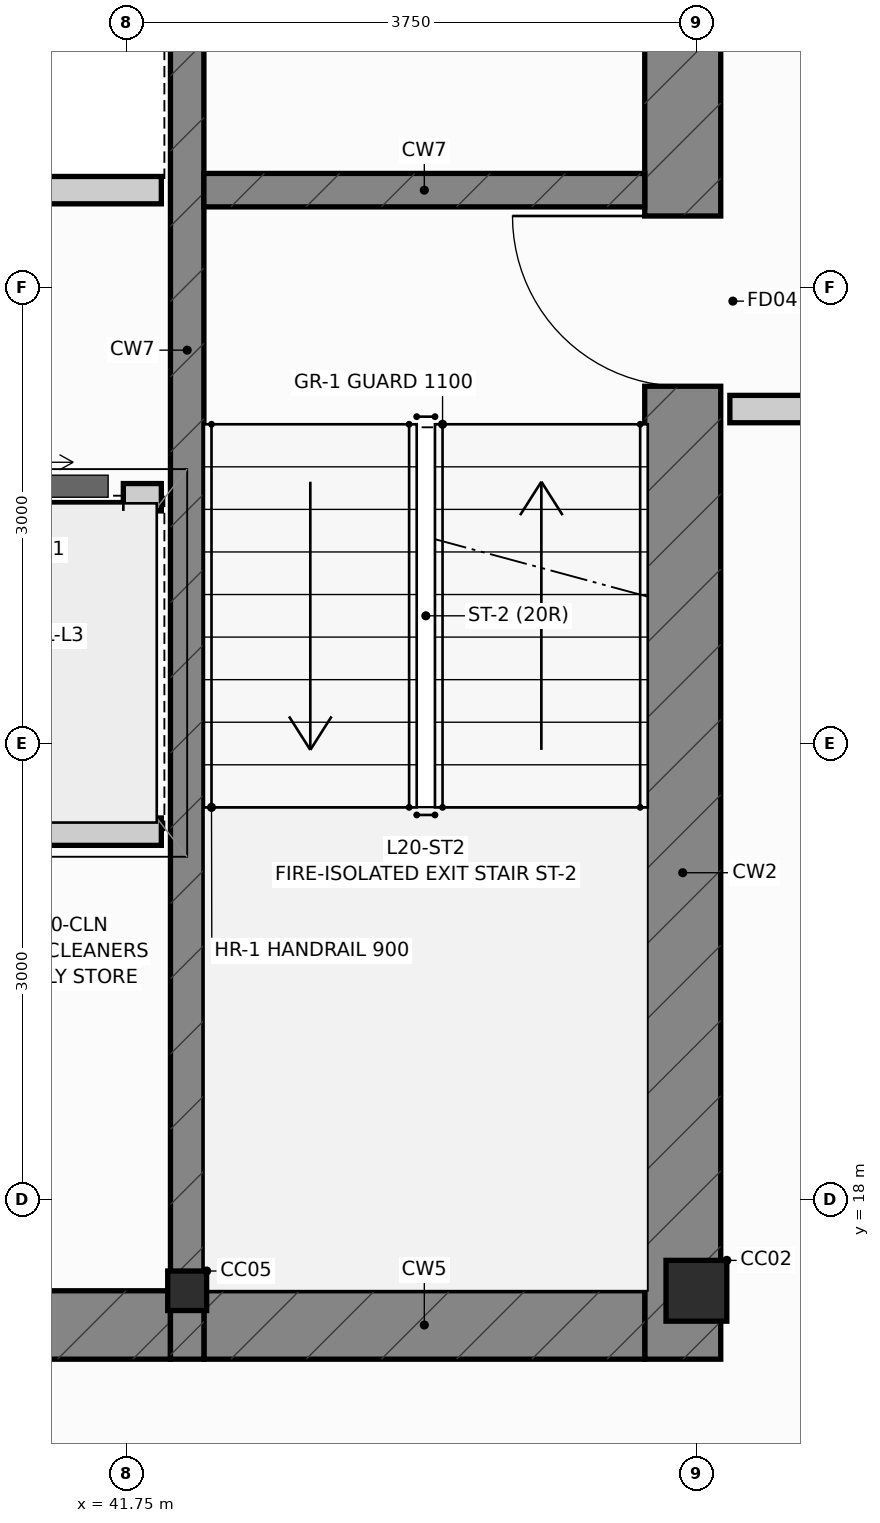
"""IFC4 building model, lengths in metres.
Left out: names, types, materials, properties, quantities, classifications, styles, units other than length and angle.
Written with IfcOpenShell. Run it as: python <this file> out.ifc"""

import sys

from ifc_helpers import new_model, si_unit, direction, frame, frame_2d, origin, origin_2d, place, context, subcontext, project, spatial, rectangle, i_section, extrude, source, transform, mapped, element, fill, save


model = new_model("IFC4")
c1 = context("Model", 3, precision=1e-05, world=origin(), true_north=direction((0.0, 1.0)))
c2 = subcontext(c1, "Body", "Model", "MODEL_VIEW")
j1 = project(units=[si_unit("LENGTHUNIT", "METRE"), si_unit("PLANEANGLEUNIT", "RADIAN")], contexts=[c1])
p1 = place(None, origin())
s1 = spatial("IfcSite", under=j1, at=p1, CompositionType="ELEMENT")
p2 = place(p1, origin())
s2 = spatial("IfcBuilding", under=s1, at=p2, CompositionType="ELEMENT")
p3 = place(p2, frame((0.0, 0.0, 105.4)))
s3 = spatial("IfcBuildingStorey", under=s2, at=p3, CompositionType="ELEMENT", Elevation=105.4)
m1 = source(origin(), c2, "Body", "SweptSolid", [
    extrude(i_section(OverallWidth=0.4, OverallDepth=0.4, WebThickness=0.02, FlangeThickness=0.032, at=origin_2d()), origin(), (0.0, 0.0, 1.0), 3.65),
])
p4 = place(p3, frame((45.5, 17.4, 0.0), z_axis=(0.0, 0.0, 1.0), x_axis=(1.0, 0.0, 0.0)))
e1 = element("IfcColumn", 1, at=p4, inside=s3, PredefinedType="COLUMN", context=c2, shape_type="MappedRepresentation", body=[
    mapped(m1, transform((0.0, 0.0, 0.0), scale=1.0)),
])
m2 = source(origin(), c2, "Body", "SweptSolid", [
    extrude(i_section(OverallWidth=0.256, OverallDepth=0.26, WebThickness=0.01, FlangeThickness=0.017, at=origin_2d()), origin(), (0.0, 0.0, 1.0), 3.65),
])
p5 = place(p3, frame((42.15, 17.4, 0.0), z_axis=(0.0, 0.0, 1.0), x_axis=(1.0, 0.0, 0.0)))
e2 = element("IfcColumn", 2, at=p5, inside=s3, PredefinedType="COLUMN", context=c2, shape_type="MappedRepresentation", body=[
    mapped(m2, transform((0.0, 0.0, 0.0), scale=1.0)),
])
p6 = place(p3, frame((45.41, 16.95, 0.0), z_axis=(0.0, 0.0, 1.0), x_axis=(0.0, 1.0, 0.0)))
e3 = element("IfcWall", 3, at=p6, inside=s3, PredefinedType="SHEAR", context=c2, shape_type="SweptSolid", body=[
    extrude(rectangle(XDim=13.275, YDim=0.5, at=frame_2d((6.638, 0.0))), origin(), (0.0, 0.0, 1.0), 3.65),
])
p7 = place(p6, frame((6.4, 0.0, 0.0)))
e4 = element("IfcOpeningElement", 4, at=p7, cuts=e3, PredefinedType="OPENING", context=c2, shape_type="SweptSolid", body=[
    extrude(rectangle(XDim=1.12, YDim=2.15, at=frame_2d((0.56, 1.075))), frame((0.0, 0.262, 0.0), z_axis=(0.0, -1.0, 0.0), x_axis=(1.0, 0.0, 0.0)), (0.0, 0.0, 1.0), 0.524),
])
p8 = place(p6, frame((10.85, 0.0, 0.0)))
e5 = element("IfcOpeningElement", 5, at=p8, cuts=e3, PredefinedType="OPENING", context=c2, shape_type="SweptSolid", body=[
    extrude(rectangle(XDim=1.2, YDim=2.2, at=frame_2d((0.6, 1.1))), frame((0.0, 0.262, 0.0), z_axis=(0.0, -1.0, 0.0), x_axis=(1.0, 0.0, 0.0)), (0.0, 0.0, 1.0), 0.524),
])
p9 = place(p3, frame((33.96, 17.175, 0.0), z_axis=(0.0, 0.0, 1.0), x_axis=(1.0, 0.0, 0.0)))
e6 = element("IfcWall", 6, at=p9, inside=s3, PredefinedType="SHEAR", context=c2, shape_type="SweptSolid", body=[
    extrude(rectangle(XDim=8.08, YDim=0.45, at=frame_2d((4.04, 0.0))), origin(), (0.0, 0.0, 1.0), 3.65),
])
p10 = place(p3, frame((42.26, 17.175, 0.0), z_axis=(0.0, 0.0, 1.0), x_axis=(1.0, 0.0, 0.0)))
e7 = element("IfcWall", 7, at=p10, inside=s3, PredefinedType="SHEAR", context=c2, shape_type="SweptSolid", body=[
    extrude(rectangle(XDim=2.9, YDim=0.45, at=frame_2d((1.45, 0.0))), origin(), (0.0, 0.0, 1.0), 3.65),
])
p11 = place(p3, frame((42.15, 16.95, 0.0), z_axis=(0.0, 0.0, 1.0), x_axis=(0.0, 1.0, 0.0)))
e8 = element("IfcWall", 8, at=p11, inside=s3, PredefinedType="SHEAR", context=c2, shape_type="SweptSolid", body=[
    extrude(rectangle(XDim=13.275, YDim=0.22, at=frame_2d((6.638, 0.0))), origin(), (0.0, 0.0, 1.0), 3.65),
])
p12 = place(p3, frame((42.26, 24.64, 0.0), z_axis=(0.0, 0.0, 1.0), x_axis=(1.0, 0.0, 0.0)))
e9 = element("IfcWall", 9, at=p12, inside=s3, PredefinedType="SHEAR", context=c2, shape_type="SweptSolid", body=[
    extrude(rectangle(XDim=2.9, YDim=0.22, at=frame_2d((1.45, 0.0))), origin(), (0.0, 0.0, 1.0), 3.65),
])
p13 = place(p3, frame((40.28, 22.62, 0.0), z_axis=(0.0, 0.0, 1.0), x_axis=(1.0, 0.0, 0.0)))
e10 = element("IfcWall", 10, at=p13, inside=s3, PredefinedType="PARTITIONING", context=c2, shape_type="SweptSolid", body=[
    extrude(rectangle(XDim=1.7, YDim=0.18, at=frame_2d((0.85, 0.0))), origin(), (0.0, 0.0, 1.0), 3.4),
])
p14 = place(p13, frame((0.35, 0.0, 0.0)))
e11 = element("IfcOpeningElement", 11, at=p14, cuts=e10, PredefinedType="OPENING", context=c2, shape_type="SweptSolid", body=[
    extrude(rectangle(XDim=1.1, YDim=2.2, at=frame_2d((0.55, 1.1))), frame((0.0, 0.102, 0.0), z_axis=(0.0, -1.0, 0.0), x_axis=(1.0, 0.0, 0.0)), (0.0, 0.0, 1.0), 0.204),
])
p15 = place(p3, frame((40.2, 24.64, 0.0), z_axis=(0.0, 0.0, 1.0), x_axis=(1.0, 0.0, 0.0)))
e12 = element("IfcWall", 12, at=p15, inside=s3, PredefinedType="PARTITIONING", context=c2, shape_type="SweptSolid", body=[
    extrude(rectangle(XDim=1.78, YDim=0.18, at=frame_2d((0.89, 0.0))), origin(), (0.0, 0.0, 1.0), 3.4),
])
p16 = place(p3, frame((45.72, 23.2, 0.0), z_axis=(0.0, 0.0, 1.0), x_axis=(1.0, 0.0, 0.0)))
e13 = element("IfcWall", 13, at=p16, inside=s3, PredefinedType="PARTITIONING", context=c2, shape_type="SweptSolid", body=[
    extrude(rectangle(XDim=2.76, YDim=0.18, at=frame_2d((1.38, 0.0))), origin(), (0.0, 0.0, 1.0), 3.4),
])
p17 = place(p3, frame((40.22, 20.42, 0.0), z_axis=(0.0, 0.0, 1.0), x_axis=(1.0, 0.0, 0.0)))
e14 = element("IfcWall", 14, at=p17, inside=s3, PredefinedType="PARTITIONING", context=c2, shape_type="SweptSolid", body=[
    extrude(rectangle(XDim=1.76, YDim=0.18, at=frame_2d((0.88, 0.0))), origin(), (0.0, 0.0, 1.0), 3.4),
])
p18 = place(p7, origin())
e15 = element("IfcDoor", 15, at=p18, inside=s3, OperationType="SINGLE_SWING_RIGHT", PredefinedType="DOOR", context=c2, shape_type="SweptSolid", body=[
    extrude(rectangle(XDim=1.12, YDim=2.15, at=frame_2d((0.56, 1.075))), frame((0.0, 0.025, 0.0), z_axis=(0.0, -1.0, 0.0), x_axis=(1.0, 0.0, 0.0)), (0.0, 0.0, 1.0), 0.05),
])
fill(e4, e15)
p19 = place(p14, origin())
e16 = element("IfcDoor", 16, at=p19, inside=s3, OperationType="SLIDING_TO_LEFT", PredefinedType="DOOR", context=c2, shape_type="SweptSolid", body=[
    extrude(rectangle(XDim=1.1, YDim=2.2, at=frame_2d((0.55, 1.1))), frame((0.0, 0.025, 0.0), z_axis=(0.0, -1.0, 0.0), x_axis=(1.0, 0.0, 0.0)), (0.0, 0.0, 1.0), 0.05),
])
fill(e11, e16)
save(model, sys.argv[1])
